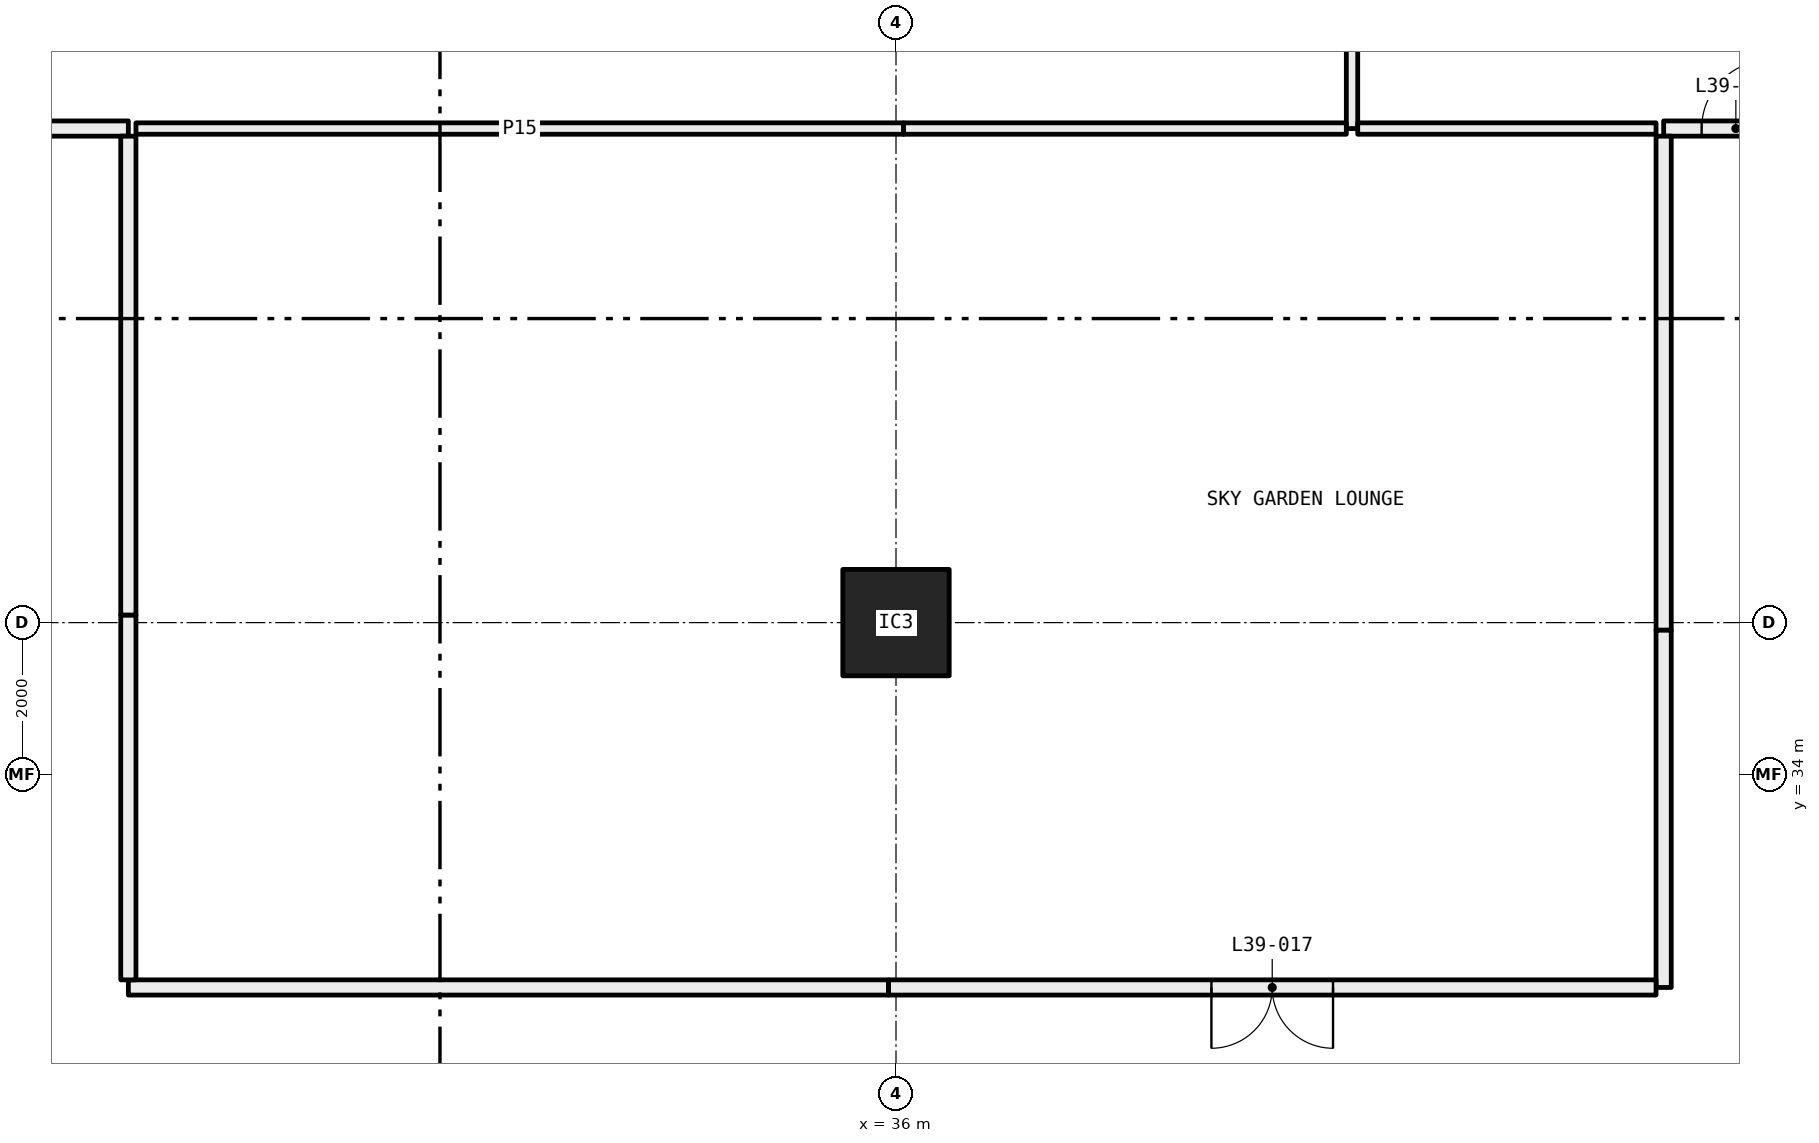
"""IFC4 building model, lengths in metres.
Left out: names, types, materials, properties, quantities, classifications, styles, units other than length and angle.
Written with IfcOpenShell. Run it as: python <this file> out.ifc"""

import sys

from ifc_helpers import new_model, si_unit, direction, frame, frame_2d, origin, origin_2d, place, context, subcontext, project, spatial, rectangle, hollow_rectangle, extrude, element, fill, save


model = new_model("IFC4")
c1 = context("Model", 3, precision=1e-05, world=origin(), true_north=direction((0.0, 1.0)))
c2 = subcontext(c1, "Body", "Model", "MODEL_VIEW")
j1 = project(units=[si_unit("LENGTHUNIT", "METRE"), si_unit("PLANEANGLEUNIT", "RADIAN")], contexts=[c1])
p1 = place(None, origin())
s1 = spatial("IfcSite", under=j1, at=p1, CompositionType="ELEMENT")
p2 = place(p1, origin())
s2 = spatial("IfcBuilding", under=s1, at=p2, CompositionType="ELEMENT")
p3 = place(p2, frame((0.0, 0.0, 148.35)))
s3 = spatial("IfcBuildingStorey", under=s2, at=p3, CompositionType="ELEMENT", Elevation=148.35)
p4 = place(p3, frame((36.0, 36.0, 0.0), z_axis=(0.0, 0.0, 1.0), x_axis=(1.0, 0.0, 0.0)))
e1 = element("IfcColumn", 1, at=p4, inside=s3, PredefinedType="COLUMN", context=c2, shape_type="SweptSolid", body=[
    extrude(hollow_rectangle(XDim=1.4, YDim=1.4, WallThickness=0.06, at=origin_2d()), origin(), (0.0, 0.0, 1.0), 5.0),
])
p5 = place(p3, frame((25.9, 42.5, 0.0), z_axis=(0.0, 0.0, 1.0), x_axis=(-1.0, 0.0, 0.0)))
e2 = element("IfcWall", 2, at=p5, inside=s3, PredefinedType="PARTITIONING", context=c2, shape_type="SweptSolid", body=[
    extrude(rectangle(XDim=7.9, YDim=0.2, at=frame_2d((3.95, 0.0))), origin(), (0.0, 0.0, 1.0), 5.0),
])
p6 = place(p5, frame((3.15, 0.0, 0.0)))
e3 = element("IfcOpeningElement", 3, at=p6, cuts=e2, PredefinedType="OPENING", context=c2, shape_type="SweptSolid", body=[
    extrude(rectangle(XDim=1.6, YDim=2.1, at=frame_2d((0.8, 1.05))), frame((0.0, 0.11, 0.0), z_axis=(0.0, -1.0, 0.0), x_axis=(1.0, 0.0, 0.0)), (0.0, 0.0, 1.0), 0.22),
])
p7 = place(p3, frame((48.0, 42.5, 0.0), z_axis=(0.0, 0.0, 1.0), x_axis=(-1.0, 0.0, 0.0)))
e4 = element("IfcWall", 4, at=p7, inside=s3, PredefinedType="PARTITIONING", context=c2, shape_type="SweptSolid", body=[
    extrude(rectangle(XDim=1.9, YDim=0.2, at=frame_2d((0.95, 0.0))), origin(), (0.0, 0.0, 1.0), 5.0),
])
p8 = place(p7, frame((0.5, 0.0, 0.0)))
e5 = element("IfcOpeningElement", 5, at=p8, cuts=e4, PredefinedType="OPENING", context=c2, shape_type="SweptSolid", body=[
    extrude(rectangle(XDim=0.9, YDim=2.1, at=frame_2d((0.45, 1.05))), frame((0.0, 0.11, 0.0), z_axis=(0.0, -1.0, 0.0), x_axis=(1.0, 0.0, 0.0)), (0.0, 0.0, 1.0), 0.22),
])
p9 = place(p3, frame((46.1, 42.4, 0.0), z_axis=(0.0, 0.0, 1.0), x_axis=(0.0, -1.0, 0.0)))
e6 = element("IfcWall", 6, at=p9, inside=s3, PredefinedType="PARTITIONING", context=c2, shape_type="SweptSolid", body=[
    extrude(rectangle(XDim=6.5, YDim=0.2, at=frame_2d((3.25, 0.0))), origin(), (0.0, 0.0, 1.0), 4.4),
])
p10 = place(p3, frame((46.1, 35.9, 0.0), z_axis=(0.0, 0.0, 1.0), x_axis=(0.0, -1.0, 0.0)))
e7 = element("IfcWall", 7, at=p10, inside=s3, PredefinedType="PARTITIONING", context=c2, shape_type="SweptSolid", body=[
    extrude(rectangle(XDim=4.7, YDim=0.2, at=frame_2d((2.35, 0.0))), origin(), (0.0, 0.0, 1.0), 5.0),
])
p11 = place(p3, frame((46.0, 31.2, 0.0), z_axis=(0.0, 0.0, 1.0), x_axis=(-1.0, 0.0, 0.0)))
e8 = element("IfcWall", 8, at=p11, inside=s3, PredefinedType="PARTITIONING", context=c2, shape_type="SweptSolid", body=[
    extrude(rectangle(XDim=10.1, YDim=0.2, at=frame_2d((5.05, 0.0))), origin(), (0.0, 0.0, 1.0), 4.4),
])
p12 = place(p11, frame((4.25, 0.0, 0.0)))
e9 = element("IfcOpeningElement", 9, at=p12, cuts=e8, PredefinedType="OPENING", context=c2, shape_type="SweptSolid", body=[
    extrude(rectangle(XDim=1.6, YDim=2.1, at=frame_2d((0.8, 1.05))), frame((0.0, 0.11, 0.0), z_axis=(0.0, -1.0, 0.0), x_axis=(1.0, 0.0, 0.0)), (0.0, 0.0, 1.0), 0.22),
])
p13 = place(p3, frame((35.9, 31.2, 0.0), z_axis=(0.0, 0.0, 1.0), x_axis=(-1.0, 0.0, 0.0)))
e10 = element("IfcWall", 10, at=p13, inside=s3, PredefinedType="PARTITIONING", context=c2, shape_type="SweptSolid", body=[
    extrude(rectangle(XDim=10.0, YDim=0.2, at=frame_2d((5.0, 0.0))), origin(), (0.0, 0.0, 1.0), 5.0),
])
p14 = place(p3, frame((25.9, 31.3, 0.0), z_axis=(0.0, 0.0, 1.0), x_axis=(0.0, 1.0, 0.0)))
e11 = element("IfcWall", 11, at=p14, inside=s3, PredefinedType="PARTITIONING", context=c2, shape_type="SweptSolid", body=[
    extrude(rectangle(XDim=4.8, YDim=0.2, at=frame_2d((2.4, 0.0))), origin(), (0.0, 0.0, 1.0), 4.4),
])
p15 = place(p3, frame((25.9, 36.1, 0.0), z_axis=(0.0, 0.0, 1.0), x_axis=(0.0, 1.0, 0.0)))
e12 = element("IfcWall", 12, at=p15, inside=s3, PredefinedType="PARTITIONING", context=c2, shape_type="SweptSolid", body=[
    extrude(rectangle(XDim=6.3, YDim=0.2, at=frame_2d((3.15, 0.0))), origin(), (0.0, 0.0, 1.0), 5.0),
])
p16 = place(p3, frame((42.0, 42.5, 0.0), z_axis=(0.0, 0.0, 1.0), x_axis=(0.0, 1.0, 0.0)))
e13 = element("IfcWall", 13, at=p16, inside=s3, PredefinedType="PARTITIONING", context=c2, shape_type="SweptSolid", body=[
    extrude(rectangle(XDim=4.78, YDim=0.15, at=frame_2d((2.39, 0.0))), origin(), (0.0, 0.0, 1.0), 5.0),
])
p17 = place(p3, frame((26.0, 42.5, 0.0), z_axis=(0.0, 0.0, 1.0), x_axis=(1.0, 0.0, 0.0)))
e14 = element("IfcWall", 14, at=p17, inside=s3, PredefinedType="PARTITIONING", context=c2, shape_type="SweptSolid", body=[
    extrude(rectangle(XDim=10.1, YDim=0.15, at=frame_2d((5.05, 0.0))), origin(), (0.0, 0.0, 1.0), 4.4),
])
p18 = place(p3, frame((36.1, 42.5, 0.0), z_axis=(0.0, 0.0, 1.0), x_axis=(1.0, 0.0, 0.0)))
e15 = element("IfcWall", 15, at=p18, inside=s3, PredefinedType="PARTITIONING", context=c2, shape_type="SweptSolid", body=[
    extrude(rectangle(XDim=5.825, YDim=0.15, at=frame_2d((2.913, 0.0))), origin(), (0.0, 0.0, 1.0), 5.0),
])
p19 = place(p3, frame((42.075, 42.5, 0.0), z_axis=(0.0, 0.0, 1.0), x_axis=(1.0, 0.0, 0.0)))
e16 = element("IfcWall", 16, at=p19, inside=s3, PredefinedType="PARTITIONING", context=c2, shape_type="SweptSolid", body=[
    extrude(rectangle(XDim=3.925, YDim=0.15, at=frame_2d((1.962, 0.0))), origin(), (0.0, 0.0, 1.0), 5.0),
])
p20 = place(p8, frame((0.9, 0.0, 0.0), x_axis=(-1.0, 0.0, 0.0)))
e17 = element("IfcDoor", 17, at=p20, inside=s3, OperationType="SINGLE_SWING_LEFT", PredefinedType="DOOR", context=c2, shape_type="SweptSolid", body=[
    extrude(rectangle(XDim=0.9, YDim=2.1, at=frame_2d((0.45, 1.05))), frame((0.0, 0.025, 0.0), z_axis=(0.0, -1.0, 0.0), x_axis=(1.0, 0.0, 0.0)), (0.0, 0.0, 1.0), 0.05),
])
fill(e5, e17)
p21 = place(p12, origin())
e18 = element("IfcDoor", 18, at=p21, inside=s3, OperationType="DOUBLE_DOOR_SINGLE_SWING", PredefinedType="DOOR", context=c2, shape_type="SweptSolid", body=[
    extrude(rectangle(XDim=1.6, YDim=2.1, at=frame_2d((0.8, 1.05))), frame((0.0, 0.025, 0.0), z_axis=(0.0, -1.0, 0.0), x_axis=(1.0, 0.0, 0.0)), (0.0, 0.0, 1.0), 0.05),
])
fill(e9, e18)
save(model, sys.argv[1])
